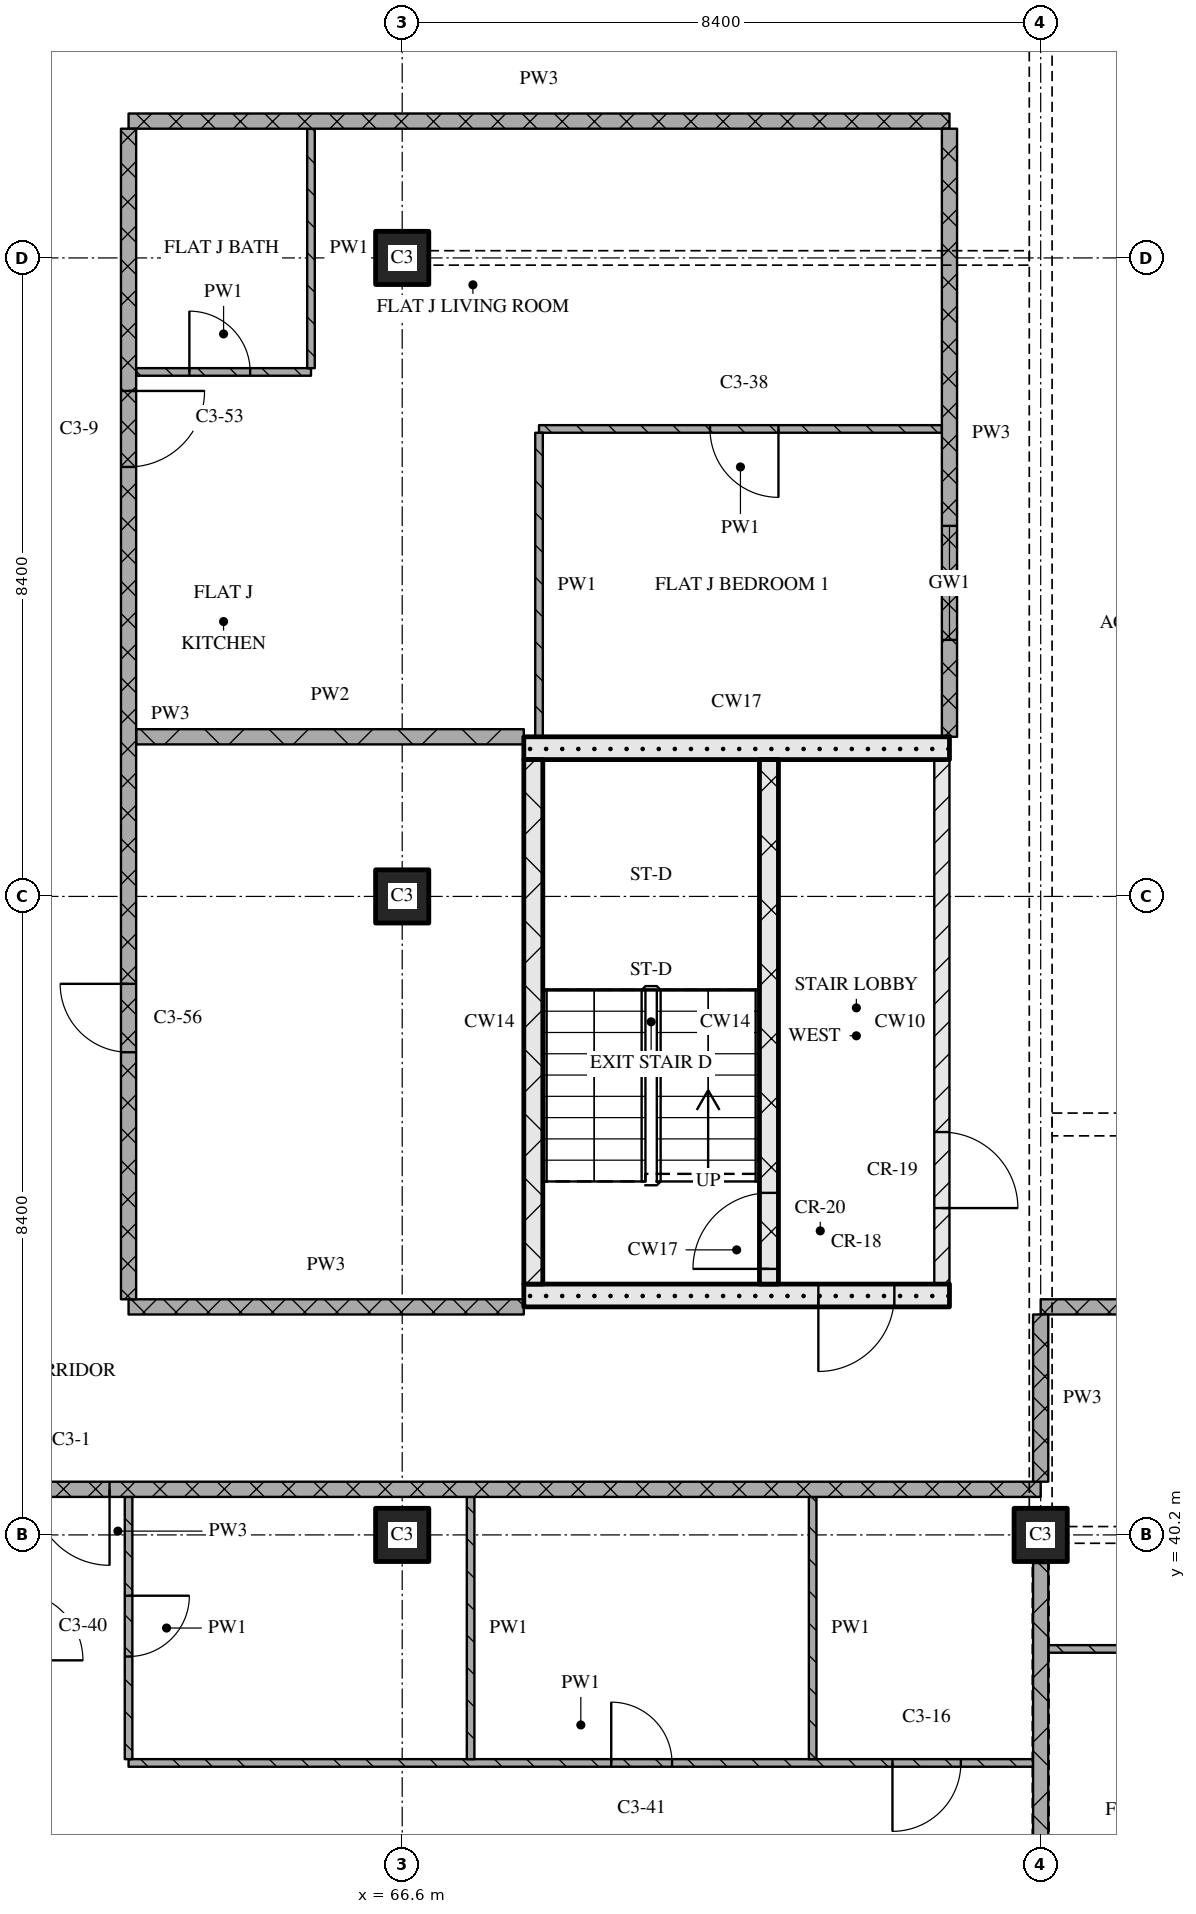
"""IFC4 building model, lengths in metres.
Left out: names, types, materials, properties, quantities, classifications, styles, units other than length and angle.
Written with IfcOpenShell. Run it as: python <this file> out.ifc"""

import sys

from ifc_helpers import new_model, si_unit, direction, frame, frame_2d, origin, origin_2d, place, context, subcontext, project, spatial, rectangle, extrude, element, fill, save


model = new_model("IFC4")
c1 = context("Model", 3, precision=1e-05, world=origin(), true_north=direction((0.0, 1.0)))
c2 = subcontext(c1, "Body", "Model", "MODEL_VIEW")
j1 = project(units=[si_unit("LENGTHUNIT", "METRE"), si_unit("PLANEANGLEUNIT", "RADIAN")], contexts=[c1])
p1 = place(None, origin())
s1 = spatial("IfcSite", under=j1, at=p1, CompositionType="ELEMENT")
p2 = place(p1, origin())
s2 = spatial("IfcBuilding", under=s1, at=p2, CompositionType="ELEMENT")
p3 = place(p2, frame((0.0, 0.0, 176.25)))
s3 = spatial("IfcBuildingStorey", under=s2, at=p3, CompositionType="ELEMENT", Elevation=176.25)
for number, where, z_axis, x_axis in (
    (1, (66.6, 40.2, 0.0), (0.0, 0.0, 1.0), (1.0, 0.0, 0.0)),
    (2, (66.6, 48.6, 0.0), (0.0, 0.0, 1.0), (1.0, 0.0, 0.0)),
    (3, (66.6, 57.0, 0.0), (0.0, 0.0, 1.0), (1.0, 0.0, 0.0)),
    (4, (75.0, 40.2, 0.0), (0.0, 0.0, 1.0), (1.0, 0.0, 0.0)),
):
    element("IfcColumn", number, at=place(p3, frame(where, z_axis=z_axis, x_axis=x_axis)), inside=s3, PredefinedType="COLUMN", context=c2, shape_type="SweptSolid", body=[
        extrude(rectangle(XDim=0.7, YDim=0.7, at=origin_2d()), origin(), (0.0, 0.0, 1.0), 3.6),
    ])
p4 = place(p3, frame((68.2, 43.35, 0.0), z_axis=(0.0, 0.0, 1.0), x_axis=(1.0, 0.0, 0.0)))
e5 = element("IfcWall", 5, at=p4, inside=s3, PredefinedType="SOLIDWALL", context=c2, shape_type="SweptSolid", body=[
    extrude(rectangle(XDim=5.6, YDim=0.3, at=frame_2d((2.8, 0.0))), origin(), (0.0, 0.0, 1.0), 3.32),
])
p5 = place(p4, frame((3.875, 0.0, 0.0)))
e6 = element("IfcOpeningElement", 6, at=p5, cuts=e5, PredefinedType="OPENING", context=c2, shape_type="SweptSolid", body=[
    extrude(rectangle(XDim=1.0, YDim=2.1, at=frame_2d((0.5, 1.05))), frame((0.0, 0.16, 0.0), z_axis=(0.0, -1.0, 0.0), x_axis=(1.0, 0.0, 0.0)), (0.0, 0.0, 1.0), 0.32),
])
p6 = place(p3, frame((68.325, 43.5, 0.0), z_axis=(0.0, 0.0, 1.0), x_axis=(0.0, 1.0, 0.0)))
e7 = element("IfcWall", 7, at=p6, inside=s3, PredefinedType="SOLIDWALL", context=c2, shape_type="SweptSolid", body=[
    extrude(rectangle(XDim=6.9, YDim=0.25, at=frame_2d((3.45, 0.0))), origin(), (0.0, 0.0, 1.0), 3.32),
])
p7 = place(p3, frame((71.425, 43.5, 0.0), z_axis=(0.0, 0.0, 1.0), x_axis=(0.0, 1.0, 0.0)))
e8 = element("IfcWall", 8, at=p7, inside=s3, PredefinedType="SOLIDWALL", context=c2, shape_type="SweptSolid", body=[
    extrude(rectangle(XDim=6.9, YDim=0.25, at=frame_2d((3.45, 0.0))), origin(), (0.0, 0.0, 1.0), 3.32),
])
p8 = place(p7, frame((0.2, 0.0, 0.0)))
e9 = element("IfcOpeningElement", 9, at=p8, cuts=e8, PredefinedType="OPENING", context=c2, shape_type="SweptSolid", body=[
    extrude(rectangle(XDim=1.0, YDim=2.1, at=frame_2d((0.5, 1.05))), frame((0.0, 0.135, 0.0), z_axis=(0.0, -1.0, 0.0), x_axis=(1.0, 0.0, 0.0)), (0.0, 0.0, 1.0), 0.27),
])
p9 = place(p3, frame((73.7, 43.5, 0.0), z_axis=(0.0, 0.0, 1.0), x_axis=(0.0, 1.0, 0.0)))
e10 = element("IfcWall", 10, at=p9, inside=s3, PredefinedType="PARTITIONING", context=c2, shape_type="SweptSolid", body=[
    extrude(rectangle(XDim=6.9, YDim=0.2, at=frame_2d((3.45, 0.0))), origin(), (0.0, 0.0, 1.0), 3.32),
])
p10 = place(p9, frame((1.0, 0.0, 0.0)))
e11 = element("IfcOpeningElement", 11, at=p10, cuts=e10, PredefinedType="OPENING", context=c2, shape_type="SweptSolid", body=[
    extrude(rectangle(XDim=1.0, YDim=2.1, at=frame_2d((0.5, 1.05))), frame((0.0, 0.11, 0.0), z_axis=(0.0, -1.0, 0.0), x_axis=(1.0, 0.0, 0.0)), (0.0, 0.0, 1.0), 0.22),
])
p11 = place(p3, frame((68.2, 50.55, 0.0), z_axis=(0.0, 0.0, 1.0), x_axis=(1.0, 0.0, 0.0)))
e12 = element("IfcWall", 12, at=p11, inside=s3, PredefinedType="SOLIDWALL", context=c2, shape_type="SweptSolid", body=[
    extrude(rectangle(XDim=5.6, YDim=0.3, at=frame_2d((2.8, 0.0))), origin(), (0.0, 0.0, 1.0), 3.32),
])
p12 = place(p3, frame((63.0, 37.2, 0.0), z_axis=(0.0, 0.0, 1.0), x_axis=(1.0, 0.0, 0.0)))
e13 = element("IfcWall", 13, at=p12, inside=s3, PredefinedType="PARTITIONING", context=c2, shape_type="SweptSolid", body=[
    extrude(rectangle(XDim=11.9, YDim=0.1, at=frame_2d((5.95, 0.0))), origin(), (0.0, 0.0, 1.0), 3.32),
])
p13 = place(p12, frame((6.35, 0.0, 0.0)))
e14 = element("IfcOpeningElement", 14, at=p13, cuts=e13, PredefinedType="OPENING", context=c2, shape_type="SweptSolid", body=[
    extrude(rectangle(XDim=0.8, YDim=2.1, at=frame_2d((0.4, 1.05))), frame((0.0, 0.06, 0.0), z_axis=(0.0, -1.0, 0.0), x_axis=(1.0, 0.0, 0.0)), (0.0, 0.0, 1.0), 0.12),
])
p14 = place(p12, frame((10.05, 0.0, 0.0)))
e15 = element("IfcOpeningElement", 15, at=p14, cuts=e13, PredefinedType="OPENING", context=c2, shape_type="SweptSolid", body=[
    extrude(rectangle(XDim=0.9, YDim=2.1, at=frame_2d((0.45, 1.05))), frame((0.0, 0.06, 0.0), z_axis=(0.0, -1.0, 0.0), x_axis=(1.0, 0.0, 0.0)), (0.0, 0.0, 1.0), 0.12),
])
p15 = place(p3, frame((75.1, 38.7, 0.0), z_axis=(0.0, 0.0, 1.0), x_axis=(1.0, 0.0, 0.0)))
e16 = element("IfcWall", 16, at=p15, inside=s3, PredefinedType="PARTITIONING", context=c2, shape_type="SweptSolid", body=[
    extrude(rectangle(XDim=6.8, YDim=0.1, at=frame_2d((3.4, 0.0))), origin(), (0.0, 0.0, 1.0), 3.32),
])
p16 = place(p15, frame((1.75, 0.0, 0.0)))
e17 = element("IfcOpeningElement", 17, at=p16, cuts=e16, PredefinedType="OPENING", context=c2, shape_type="SweptSolid", body=[
    extrude(rectangle(XDim=0.8, YDim=2.1, at=frame_2d((0.4, 1.05))), frame((0.0, 0.06, 0.0), z_axis=(0.0, -1.0, 0.0), x_axis=(1.0, 0.0, 0.0)), (0.0, 0.0, 1.0), 0.12),
])
p17 = place(p15, frame((5.2, 0.0, 0.0)))
e18 = element("IfcOpeningElement", 18, at=p17, cuts=e16, PredefinedType="OPENING", context=c2, shape_type="SweptSolid", body=[
    extrude(rectangle(XDim=0.8, YDim=2.1, at=frame_2d((0.4, 1.05))), frame((0.0, 0.06, 0.0), z_axis=(0.0, -1.0, 0.0), x_axis=(1.0, 0.0, 0.0)), (0.0, 0.0, 1.0), 0.12),
])
p18 = place(p3, frame((75.0, 40.8, 0.0), z_axis=(0.0, 0.0, 1.0), x_axis=(-1.0, 0.0, 0.0)))
e19 = element("IfcWall", 19, at=p18, inside=s3, PredefinedType="PARTITIONING", context=c2, shape_type="SweptSolid", body=[
    extrude(rectangle(XDim=24.28, YDim=0.2, at=frame_2d((12.14, 0.0))), origin(), (0.0, 0.0, 1.0), 3.32),
])
p19 = place(p18, frame((12.25, 0.0, 0.0)))
e20 = element("IfcOpeningElement", 20, at=p19, cuts=e19, PredefinedType="OPENING", context=c2, shape_type="SweptSolid", body=[
    extrude(rectangle(XDim=1.0, YDim=2.1, at=frame_2d((0.5, 1.05))), frame((0.0, 0.11, 0.0), z_axis=(0.0, -1.0, 0.0), x_axis=(1.0, 0.0, 0.0)), (0.0, 0.0, 1.0), 0.22),
])
p20 = place(p3, frame((63.0, 43.2, 0.0), z_axis=(0.0, 0.0, 1.0), x_axis=(1.0, 0.0, 0.0)))
e21 = element("IfcWall", 21, at=p20, inside=s3, PredefinedType="PARTITIONING", context=c2, shape_type="SweptSolid", body=[
    extrude(rectangle(XDim=5.2, YDim=0.2, at=frame_2d((2.6, 0.0))), origin(), (0.0, 0.0, 1.0), 3.32),
])
p21 = place(p3, frame((100.2, 43.2, 0.0), z_axis=(0.0, 0.0, 1.0), x_axis=(-1.0, 0.0, 0.0)))
e22 = element("IfcWall", 22, at=p21, inside=s3, PredefinedType="PARTITIONING", context=c2, shape_type="SweptSolid", body=[
    extrude(rectangle(XDim=25.2, YDim=0.2, at=frame_2d((12.6, 0.0))), origin(), (0.0, 0.0, 1.0), 3.32),
])
p22 = place(p21, frame((4.45, 0.0, 0.0)))
e23 = element("IfcOpeningElement", 23, at=p22, cuts=e22, PredefinedType="OPENING", context=c2, shape_type="SweptSolid", body=[
    extrude(rectangle(XDim=1.0, YDim=2.1, at=frame_2d((0.5, 1.05))), frame((0.0, 0.11, 0.0), z_axis=(0.0, -1.0, 0.0), x_axis=(1.0, 0.0, 0.0)), (0.0, 0.0, 1.0), 0.22),
])
p23 = place(p21, frame((17.05, 0.0, 0.0)))
e24 = element("IfcOpeningElement", 24, at=p23, cuts=e22, PredefinedType="OPENING", context=c2, shape_type="SweptSolid", body=[
    extrude(rectangle(XDim=1.0, YDim=2.1, at=frame_2d((0.5, 1.05))), frame((0.0, 0.11, 0.0), z_axis=(0.0, -1.0, 0.0), x_axis=(1.0, 0.0, 0.0)), (0.0, 0.0, 1.0), 0.22),
])
p24 = place(p3, frame((63.1, 50.7, 0.0), z_axis=(0.0, 0.0, 1.0), x_axis=(1.0, 0.0, 0.0)))
e25 = element("IfcWall", 25, at=p24, inside=s3, PredefinedType="PARTITIONING", context=c2, shape_type="SweptSolid", body=[
    extrude(rectangle(XDim=5.1, YDim=0.2, at=frame_2d((2.55, 0.0))), origin(), (0.0, 0.0, 1.0), 3.32),
])
p25 = place(p3, frame((73.7, 54.75, 0.0), z_axis=(0.0, 0.0, 1.0), x_axis=(-1.0, 0.0, 0.0)))
e26 = element("IfcWall", 26, at=p25, inside=s3, PredefinedType="PARTITIONING", context=c2, shape_type="SweptSolid", body=[
    extrude(rectangle(XDim=5.3, YDim=0.1, at=frame_2d((2.65, 0.0))), origin(), (0.0, 0.0, 1.0), 3.32),
])
p26 = place(p25, frame((2.15, 0.0, 0.0)))
e27 = element("IfcOpeningElement", 27, at=p26, cuts=e26, PredefinedType="OPENING", context=c2, shape_type="SweptSolid", body=[
    extrude(rectangle(XDim=0.9, YDim=2.1, at=frame_2d((0.45, 1.05))), frame((0.0, 0.06, 0.0), z_axis=(0.0, -1.0, 0.0), x_axis=(1.0, 0.0, 0.0)), (0.0, 0.0, 1.0), 0.12),
])
p27 = place(p3, frame((63.1, 55.5, 0.0), z_axis=(0.0, 0.0, 1.0), x_axis=(1.0, 0.0, 0.0)))
e28 = element("IfcWall", 28, at=p27, inside=s3, PredefinedType="PARTITIONING", context=c2, shape_type="SweptSolid", body=[
    extrude(rectangle(XDim=2.3, YDim=0.1, at=frame_2d((1.15, 0.0))), origin(), (0.0, 0.0, 1.0), 3.32),
])
p28 = place(p27, frame((0.7, 0.0, 0.0)))
e29 = element("IfcOpeningElement", 29, at=p28, cuts=e28, PredefinedType="OPENING", context=c2, shape_type="SweptSolid", body=[
    extrude(rectangle(XDim=0.8, YDim=2.1, at=frame_2d((0.4, 1.05))), frame((0.0, 0.06, 0.0), z_axis=(0.0, -1.0, 0.0), x_axis=(1.0, 0.0, 0.0)), (0.0, 0.0, 1.0), 0.12),
])
p29 = place(p3, frame((63.0, 58.8, 0.0), z_axis=(0.0, 0.0, 1.0), x_axis=(1.0, 0.0, 0.0)))
e30 = element("IfcWall", 30, at=p29, inside=s3, PredefinedType="PARTITIONING", context=c2, shape_type="SweptSolid", body=[
    extrude(rectangle(XDim=10.8, YDim=0.2, at=frame_2d((5.4, 0.0))), origin(), (0.0, 0.0, 1.0), 3.32),
])
p30 = place(p3, frame((63.0, 58.7, 0.0), z_axis=(0.0, 0.0, 1.0), x_axis=(0.0, -1.0, 0.0)))
e31 = element("IfcWall", 31, at=p30, inside=s3, PredefinedType="PARTITIONING", context=c2, shape_type="SweptSolid", body=[
    extrude(rectangle(XDim=15.4, YDim=0.2, at=frame_2d((7.7, 0.0))), origin(), (0.0, 0.0, 1.0), 3.32),
])
p31 = place(p30, frame((3.45, 0.0, 0.0)))
e32 = element("IfcOpeningElement", 32, at=p31, cuts=e31, PredefinedType="OPENING", context=c2, shape_type="SweptSolid", body=[
    extrude(rectangle(XDim=1.0, YDim=2.1, at=frame_2d((0.5, 1.05))), frame((0.0, 0.11, 0.0), z_axis=(0.0, -1.0, 0.0), x_axis=(1.0, 0.0, 0.0)), (0.0, 0.0, 1.0), 0.22),
])
p32 = place(p30, frame((11.25, 0.0, 0.0)))
e33 = element("IfcOpeningElement", 33, at=p32, cuts=e31, PredefinedType="OPENING", context=c2, shape_type="SweptSolid", body=[
    extrude(rectangle(XDim=0.9, YDim=2.1, at=frame_2d((0.45, 1.05))), frame((0.0, 0.11, 0.0), z_axis=(0.0, -1.0, 0.0), x_axis=(1.0, 0.0, 0.0)), (0.0, 0.0, 1.0), 0.22),
])
p33 = place(p3, frame((63.0, 40.7, 0.0), z_axis=(0.0, 0.0, 1.0), x_axis=(0.0, -1.0, 0.0)))
e34 = element("IfcWall", 34, at=p33, inside=s3, PredefinedType="PARTITIONING", context=c2, shape_type="SweptSolid", body=[
    extrude(rectangle(XDim=3.45, YDim=0.1, at=frame_2d((1.725, 0.0))), origin(), (0.0, 0.0, 1.0), 3.32),
])
p34 = place(p33, frame((1.3, 0.0, 0.0)))
e35 = element("IfcOpeningElement", 35, at=p34, cuts=e34, PredefinedType="OPENING", context=c2, shape_type="SweptSolid", body=[
    extrude(rectangle(XDim=0.8, YDim=2.1, at=frame_2d((0.4, 1.05))), frame((0.0, 0.06, 0.0), z_axis=(0.0, -1.0, 0.0), x_axis=(1.0, 0.0, 0.0)), (0.0, 0.0, 1.0), 0.12),
])
p35 = place(p3, frame((65.4, 58.7, 0.0), z_axis=(0.0, 0.0, 1.0), x_axis=(0.0, -1.0, 0.0)))
e36 = element("IfcWall", 36, at=p35, inside=s3, PredefinedType="PARTITIONING", context=c2, shape_type="SweptSolid", body=[
    extrude(rectangle(XDim=3.15, YDim=0.1, at=frame_2d((1.575, 0.0))), origin(), (0.0, 0.0, 1.0), 3.32),
])
p36 = place(p3, frame((67.5, 40.7, 0.0), z_axis=(0.0, 0.0, 1.0), x_axis=(0.0, -1.0, 0.0)))
e37 = element("IfcWall", 37, at=p36, inside=s3, PredefinedType="PARTITIONING", context=c2, shape_type="SweptSolid", body=[
    extrude(rectangle(XDim=3.45, YDim=0.1, at=frame_2d((1.725, 0.0))), origin(), (0.0, 0.0, 1.0), 3.32),
])
p37 = place(p3, frame((68.4, 54.7, 0.0), z_axis=(0.0, 0.0, 1.0), x_axis=(0.0, -1.0, 0.0)))
e38 = element("IfcWall", 38, at=p37, inside=s3, PredefinedType="PARTITIONING", context=c2, shape_type="SweptSolid", body=[
    extrude(rectangle(XDim=4.0, YDim=0.1, at=frame_2d((2.0, 0.0))), origin(), (0.0, 0.0, 1.0), 3.32),
])
p38 = place(p3, frame((72.0, 40.7, 0.0), z_axis=(0.0, 0.0, 1.0), x_axis=(0.0, -1.0, 0.0)))
e39 = element("IfcWall", 39, at=p38, inside=s3, PredefinedType="PARTITIONING", context=c2, shape_type="SweptSolid", body=[
    extrude(rectangle(XDim=3.45, YDim=0.1, at=frame_2d((1.725, 0.0))), origin(), (0.0, 0.0, 1.0), 3.32),
])
p39 = place(p3, frame((73.8, 58.7, 0.0), z_axis=(0.0, 0.0, 1.0), x_axis=(0.0, -1.0, 0.0)))
e40 = element("IfcWall", 40, at=p39, inside=s3, PredefinedType="PARTITIONING", context=c2, shape_type="SweptSolid", body=[
    extrude(rectangle(XDim=8.0, YDim=0.2, at=frame_2d((4.0, 0.0))), origin(), (0.0, 0.0, 1.0), 3.32),
])
p40 = place(p39, frame((5.225, 0.0, 0.9)))
e41 = element("IfcOpeningElement", 41, at=p40, cuts=e40, PredefinedType="OPENING", context=c2, shape_type="SweptSolid", body=[
    extrude(rectangle(XDim=1.5, YDim=1.5, at=frame_2d((0.75, 0.75))), frame((0.0, 0.11, 0.0), z_axis=(0.0, -1.0, 0.0), x_axis=(1.0, 0.0, 0.0)), (0.0, 0.0, 1.0), 0.22),
])
p41 = place(p3, frame((75.0, 43.1, 0.0), z_axis=(0.0, 0.0, 1.0), x_axis=(0.0, -1.0, 0.0)))
e42 = element("IfcWall", 42, at=p41, inside=s3, PredefinedType="PARTITIONING", context=c2, shape_type="SweptSolid", body=[
    extrude(rectangle(XDim=2.2, YDim=0.2, at=frame_2d((1.1, 0.0))), origin(), (0.0, 0.0, 1.0), 2.43),
])
p42 = place(p3, frame((75.0, 39.83, 0.0), z_axis=(0.0, 0.0, 1.0), x_axis=(0.0, -1.0, 0.0)))
e43 = element("IfcWall", 43, at=p42, inside=s3, PredefinedType="PARTITIONING", context=c2, shape_type="SweptSolid", body=[
    extrude(rectangle(XDim=7.66, YDim=0.2, at=frame_2d((3.83, 0.0))), origin(), (0.0, 0.0, 1.0), 2.72),
])
p43 = place(p5, origin())
e44 = element("IfcDoor", 44, at=p43, inside=s3, OperationType="SINGLE_SWING_RIGHT", PredefinedType="DOOR", context=c2, shape_type="SweptSolid", body=[
    extrude(rectangle(XDim=1.0, YDim=2.1, at=frame_2d((0.5, 1.05))), frame((0.0, 0.025, 0.0), z_axis=(0.0, -1.0, 0.0), x_axis=(1.0, 0.0, 0.0)), (0.0, 0.0, 1.0), 0.05),
])
fill(e6, e44)
p44 = place(p8, origin())
e45 = element("IfcDoor", 45, at=p44, inside=s3, OperationType="SINGLE_SWING_LEFT", PredefinedType="DOOR", context=c2, shape_type="SweptSolid", body=[
    extrude(rectangle(XDim=1.0, YDim=2.1, at=frame_2d((0.5, 1.05))), frame((0.0, 0.025, 0.0), z_axis=(0.0, -1.0, 0.0), x_axis=(1.0, 0.0, 0.0)), (0.0, 0.0, 1.0), 0.05),
])
fill(e9, e45)
p45 = place(p10, origin())
e46 = element("IfcDoor", 46, at=p45, inside=s3, OperationType="SINGLE_SWING_RIGHT", PredefinedType="DOOR", context=c2, shape_type="SweptSolid", body=[
    extrude(rectangle(XDim=1.0, YDim=2.1, at=frame_2d((0.5, 1.05))), frame((0.0, 0.025, 0.0), z_axis=(0.0, -1.0, 0.0), x_axis=(1.0, 0.0, 0.0)), (0.0, 0.0, 1.0), 0.05),
])
fill(e11, e46)
p46 = place(p13, origin())
e47 = element("IfcDoor", 47, at=p46, inside=s3, OperationType="SINGLE_SWING_LEFT", PredefinedType="DOOR", context=c2, shape_type="SweptSolid", body=[
    extrude(rectangle(XDim=0.8, YDim=2.1, at=frame_2d((0.4, 1.05))), frame((0.0, 0.025, 0.0), z_axis=(0.0, -1.0, 0.0), x_axis=(1.0, 0.0, 0.0)), (0.0, 0.0, 1.0), 0.05),
])
fill(e14, e47)
p47 = place(p14, origin())
e48 = element("IfcDoor", 48, at=p47, inside=s3, OperationType="SINGLE_SWING_RIGHT", PredefinedType="DOOR", context=c2, shape_type="SweptSolid", body=[
    extrude(rectangle(XDim=0.9, YDim=2.1, at=frame_2d((0.45, 1.05))), frame((0.0, 0.025, 0.0), z_axis=(0.0, -1.0, 0.0), x_axis=(1.0, 0.0, 0.0)), (0.0, 0.0, 1.0), 0.05),
])
fill(e15, e48)
p48 = place(p19, origin())
e49 = element("IfcDoor", 49, at=p48, inside=s3, OperationType="SINGLE_SWING_LEFT", PredefinedType="DOOR", context=c2, shape_type="SweptSolid", body=[
    extrude(rectangle(XDim=1.0, YDim=2.1, at=frame_2d((0.5, 1.05))), frame((0.0, 0.025, 0.0), z_axis=(0.0, -1.0, 0.0), x_axis=(1.0, 0.0, 0.0)), (0.0, 0.0, 1.0), 0.05),
])
fill(e20, e49)
p49 = place(p26, origin())
e50 = element("IfcDoor", 50, at=p49, inside=s3, OperationType="SINGLE_SWING_LEFT", PredefinedType="DOOR", context=c2, shape_type="SweptSolid", body=[
    extrude(rectangle(XDim=0.9, YDim=2.1, at=frame_2d((0.45, 1.05))), frame((0.0, 0.025, 0.0), z_axis=(0.0, -1.0, 0.0), x_axis=(1.0, 0.0, 0.0)), (0.0, 0.0, 1.0), 0.05),
])
fill(e27, e50)
p50 = place(p28, origin())
e51 = element("IfcDoor", 51, at=p50, inside=s3, OperationType="SINGLE_SWING_LEFT", PredefinedType="DOOR", context=c2, shape_type="SweptSolid", body=[
    extrude(rectangle(XDim=0.8, YDim=2.1, at=frame_2d((0.4, 1.05))), frame((0.0, 0.025, 0.0), z_axis=(0.0, -1.0, 0.0), x_axis=(1.0, 0.0, 0.0)), (0.0, 0.0, 1.0), 0.05),
])
fill(e29, e51)
p51 = place(p31, origin())
e52 = element("IfcDoor", 52, at=p51, inside=s3, OperationType="SINGLE_SWING_LEFT", PredefinedType="DOOR", context=c2, shape_type="SweptSolid", body=[
    extrude(rectangle(XDim=1.0, YDim=2.1, at=frame_2d((0.5, 1.05))), frame((0.0, 0.025, 0.0), z_axis=(0.0, -1.0, 0.0), x_axis=(1.0, 0.0, 0.0)), (0.0, 0.0, 1.0), 0.05),
])
fill(e32, e52)
p52 = place(p32, origin())
e53 = element("IfcDoor", 53, at=p52, inside=s3, OperationType="SINGLE_SWING_RIGHT", PredefinedType="DOOR", context=c2, shape_type="SweptSolid", body=[
    extrude(rectangle(XDim=0.9, YDim=2.1, at=frame_2d((0.45, 1.05))), frame((0.0, 0.025, 0.0), z_axis=(0.0, -1.0, 0.0), x_axis=(1.0, 0.0, 0.0)), (0.0, 0.0, 1.0), 0.05),
])
fill(e33, e53)
p53 = place(p34, origin())
e54 = element("IfcDoor", 54, at=p53, inside=s3, OperationType="SINGLE_SWING_LEFT", PredefinedType="DOOR", context=c2, shape_type="SweptSolid", body=[
    extrude(rectangle(XDim=0.8, YDim=2.1, at=frame_2d((0.4, 1.05))), frame((0.0, 0.025, 0.0), z_axis=(0.0, -1.0, 0.0), x_axis=(1.0, 0.0, 0.0)), (0.0, 0.0, 1.0), 0.05),
])
fill(e35, e54)
p54 = place(p40, origin())
e55 = element("IfcWindow", 55, at=p54, inside=s3, PartitioningType="SINGLE_PANEL", PredefinedType="WINDOW", context=c2, shape_type="SweptSolid", body=[
    extrude(rectangle(XDim=1.5, YDim=1.5, at=frame_2d((0.75, 0.75))), frame((0.0, 0.03, 0.0), z_axis=(0.0, -1.0, 0.0), x_axis=(1.0, 0.0, 0.0)), (0.0, 0.0, 1.0), 0.06),
])
fill(e41, e55)
save(model, sys.argv[1])
